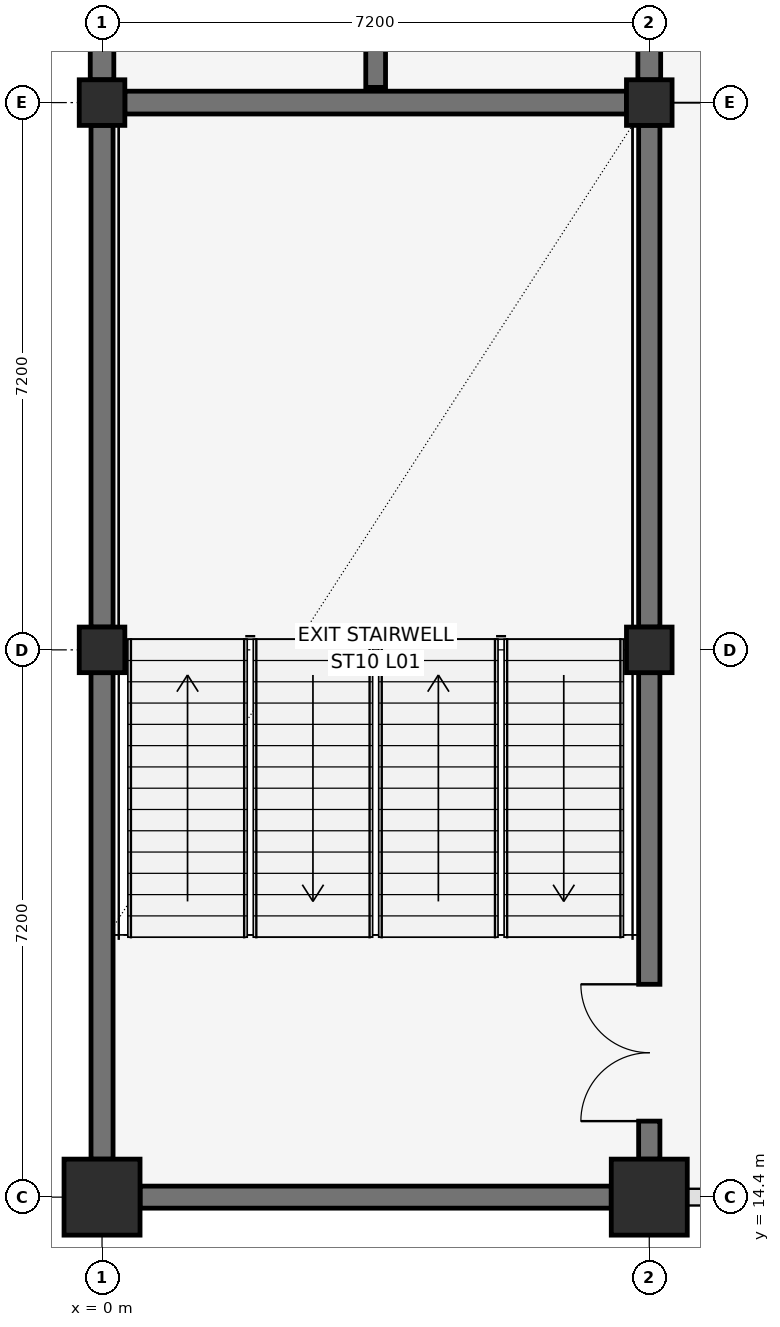
"""IFC4 building model, lengths in metres.
Left out: names, types, materials, properties, quantities, classifications, styles, units other than length and angle.
Written with IfcOpenShell. Run it as: python <this file> out.ifc"""

import sys

from ifc_helpers import new_model, si_unit, direction, frame, frame_2d, origin, origin_2d, place, context, subcontext, project, spatial, rectangle, extrude, element, fill, save


model = new_model("IFC4")
c1 = context("Model", 3, precision=1e-05, world=origin(), true_north=direction((0.0, 1.0)))
c2 = subcontext(c1, "Body", "Model", "MODEL_VIEW")
j1 = project(units=[si_unit("LENGTHUNIT", "METRE"), si_unit("PLANEANGLEUNIT", "RADIAN")], contexts=[c1])
p1 = place(None, origin())
s1 = spatial("IfcSite", under=j1, at=p1, CompositionType="ELEMENT")
p2 = place(p1, origin())
s2 = spatial("IfcBuilding", under=s1, at=p2, CompositionType="ELEMENT")
p3 = place(p2, frame((0.0, 0.0, 5.4)))
s3 = spatial("IfcBuildingStorey", under=s2, at=p3, CompositionType="ELEMENT", Elevation=5.4)
p4 = place(p3, frame((0.0, 14.4, 0.0), z_axis=(0.0, 0.0, 1.0), x_axis=(1.0, 0.0, 0.0)))
e1 = element("IfcColumn", 1, at=p4, inside=s3, PredefinedType="COLUMN", context=c2, shape_type="SweptSolid", body=[
    extrude(rectangle(XDim=1.0, YDim=1.0, at=origin_2d()), origin(), (0.0, 0.0, 1.0), 4.8),
])
for number, where, z_axis, x_axis in (
    (2, (0.0, 21.6, 0.0), (0.0, 0.0, 1.0), (1.0, 0.0, 0.0)),
    (3, (0.0, 28.8, 0.0), (0.0, 0.0, 1.0), (1.0, 0.0, 0.0)),
):
    element("IfcColumn", number, at=place(p3, frame(where, z_axis=z_axis, x_axis=x_axis)), inside=s3, PredefinedType="COLUMN", context=c2, shape_type="SweptSolid", body=[
        extrude(rectangle(XDim=0.6, YDim=0.6, at=origin_2d()), origin(), (0.0, 0.0, 1.0), 4.8),
    ])
p5 = place(p3, frame((7.2, 14.4, 0.0), z_axis=(0.0, 0.0, 1.0), x_axis=(1.0, 0.0, 0.0)))
e4 = element("IfcColumn", 4, at=p5, inside=s3, PredefinedType="COLUMN", context=c2, shape_type="SweptSolid", body=[
    extrude(rectangle(XDim=1.0, YDim=1.0, at=origin_2d()), origin(), (0.0, 0.0, 1.0), 4.8),
])
for number, where, z_axis, x_axis in (
    (5, (7.2, 21.6, 0.0), (0.0, 0.0, 1.0), (1.0, 0.0, 0.0)),
    (6, (7.2, 28.8, 0.0), (0.0, 0.0, 1.0), (1.0, 0.0, 0.0)),
):
    element("IfcColumn", number, at=place(p3, frame(where, z_axis=z_axis, x_axis=x_axis)), inside=s3, PredefinedType="COLUMN", context=c2, shape_type="SweptSolid", body=[
        extrude(rectangle(XDim=0.6, YDim=0.6, at=origin_2d()), origin(), (0.0, 0.0, 1.0), 4.8),
    ])
p6 = place(p3, frame((0.3, 28.8, 0.0), z_axis=(0.0, 0.0, 1.0), x_axis=(1.0, 0.0, 0.0)))
e7 = element("IfcWall", 7, at=p6, inside=s3, PredefinedType="SHEAR", context=c2, shape_type="SweptSolid", body=[
    extrude(rectangle(XDim=6.6, YDim=0.3, at=frame_2d((3.3, 0.0))), origin(), (0.0, 0.0, 1.0), 4.54),
])
p7 = place(p3, frame((0.0, 29.1, 0.0), z_axis=(0.0, 0.0, 1.0), x_axis=(0.0, 1.0, 0.0)))
e8 = element("IfcWall", 8, at=p7, inside=s3, PredefinedType="SHEAR", context=c2, shape_type="SweptSolid", body=[
    extrude(rectangle(XDim=6.6, YDim=0.31, at=frame_2d((3.3, 0.0))), origin(), (0.0, 0.0, 1.0), 4.54),
])
p8 = place(p3, frame((7.2, 29.1, 0.0), z_axis=(0.0, 0.0, 1.0), x_axis=(0.0, 1.0, 0.0)))
e9 = element("IfcWall", 9, at=p8, inside=s3, PredefinedType="SHEAR", context=c2, shape_type="SweptSolid", body=[
    extrude(rectangle(XDim=6.6, YDim=0.3, at=frame_2d((3.3, 0.0))), origin(), (0.0, 0.0, 1.0), 4.54),
])
p9 = place(p3, frame((3.6, 29.0, 0.0), z_axis=(0.0, 0.0, 1.0), x_axis=(0.0, 1.0, 0.0)))
e10 = element("IfcWall", 10, at=p9, inside=s3, PredefinedType="SHEAR", context=c2, shape_type="SweptSolid", body=[
    extrude(rectangle(XDim=14.0, YDim=0.26, at=frame_2d((7.0, 0.0))), origin(), (0.0, 0.0, 1.0), 4.54),
])
p10 = place(p9, frame((1.65, 0.0, 0.0)))
e11 = element("IfcOpeningElement", 11, at=p10, cuts=e10, PredefinedType="OPENING", context=c2, shape_type="SweptSolid", body=[
    extrude(rectangle(XDim=1.1, YDim=2.15, at=frame_2d((0.55, 1.075))), frame((0.0, 0.145, 0.0), z_axis=(0.0, -1.0, 0.0), x_axis=(1.0, 0.0, 0.0)), (0.0, 0.0, 1.0), 0.29),
])
p11 = place(p9, frame((10.6, 0.0, 0.0)))
e12 = element("IfcOpeningElement", 12, at=p11, cuts=e10, PredefinedType="OPENING", context=c2, shape_type="SweptSolid", body=[
    extrude(rectangle(XDim=1.1, YDim=2.2, at=frame_2d((0.55, 1.1))), frame((0.0, 0.145, 0.0), z_axis=(0.0, -1.0, 0.0), x_axis=(1.0, 0.0, 0.0)), (0.0, 0.0, 1.0), 0.29),
])
p12 = place(p3, frame((0.5, 14.4, 0.0), z_axis=(0.0, 0.0, 1.0), x_axis=(1.0, 0.0, 0.0)))
e13 = element("IfcWall", 13, at=p12, inside=s3, PredefinedType="SHEAR", context=c2, shape_type="SweptSolid", body=[
    extrude(rectangle(XDim=6.2, YDim=0.29, at=frame_2d((3.1, 0.0))), origin(), (0.0, 0.0, 1.0), 4.54),
])
p13 = place(p3, frame((0.0, 14.9, 0.0), z_axis=(0.0, 0.0, 1.0), x_axis=(0.0, 1.0, 0.0)))
e14 = element("IfcWall", 14, at=p13, inside=s3, PredefinedType="SHEAR", context=c2, shape_type="SweptSolid", body=[
    extrude(rectangle(XDim=6.4, YDim=0.29, at=frame_2d((3.2, 0.0))), origin(), (0.0, 0.0, 1.0), 4.54),
])
p14 = place(p3, frame((0.0, 21.9, 0.0), z_axis=(0.0, 0.0, 1.0), x_axis=(0.0, 1.0, 0.0)))
e15 = element("IfcWall", 15, at=p14, inside=s3, PredefinedType="SHEAR", context=c2, shape_type="SweptSolid", body=[
    extrude(rectangle(XDim=6.6, YDim=0.29, at=frame_2d((3.3, 0.0))), origin(), (0.0, 0.0, 1.0), 4.54),
])
p15 = place(p3, frame((7.2, 14.9, 0.0), z_axis=(0.0, 0.0, 1.0), x_axis=(0.0, 1.0, 0.0)))
e16 = element("IfcWall", 16, at=p15, inside=s3, PredefinedType="SHEAR", context=c2, shape_type="SweptSolid", body=[
    extrude(rectangle(XDim=6.4, YDim=0.28, at=frame_2d((3.2, 0.0))), origin(), (0.0, 0.0, 1.0), 4.54),
])
p16 = place(p15, frame((0.5, 0.0, 0.0)))
e17 = element("IfcOpeningElement", 17, at=p16, cuts=e16, PredefinedType="OPENING", context=c2, shape_type="SweptSolid", body=[
    extrude(rectangle(XDim=1.8, YDim=2.2, at=frame_2d((0.9, 1.1))), frame((0.0, 0.155, 0.0), z_axis=(0.0, -1.0, 0.0), x_axis=(1.0, 0.0, 0.0)), (0.0, 0.0, 1.0), 0.31),
])
p17 = place(p3, frame((7.2, 21.9, 0.0), z_axis=(0.0, 0.0, 1.0), x_axis=(0.0, 1.0, 0.0)))
e18 = element("IfcWall", 18, at=p17, inside=s3, PredefinedType="SHEAR", context=c2, shape_type="SweptSolid", body=[
    extrude(rectangle(XDim=6.6, YDim=0.28, at=frame_2d((3.3, 0.0))), origin(), (0.0, 0.0, 1.0), 4.54),
])
p18 = place(p16, origin())
e19 = element("IfcDoor", 19, at=p18, inside=s3, OperationType="DOUBLE_SWING_LEFT", PredefinedType="DOOR", context=c2, shape_type="SweptSolid", body=[
    extrude(rectangle(XDim=1.8, YDim=2.2, at=frame_2d((0.9, 1.1))), frame((0.0, 0.025, 0.0), z_axis=(0.0, -1.0, 0.0), x_axis=(1.0, 0.0, 0.0)), (0.0, 0.0, 1.0), 0.05),
])
fill(e17, e19)
save(model, sys.argv[1])
